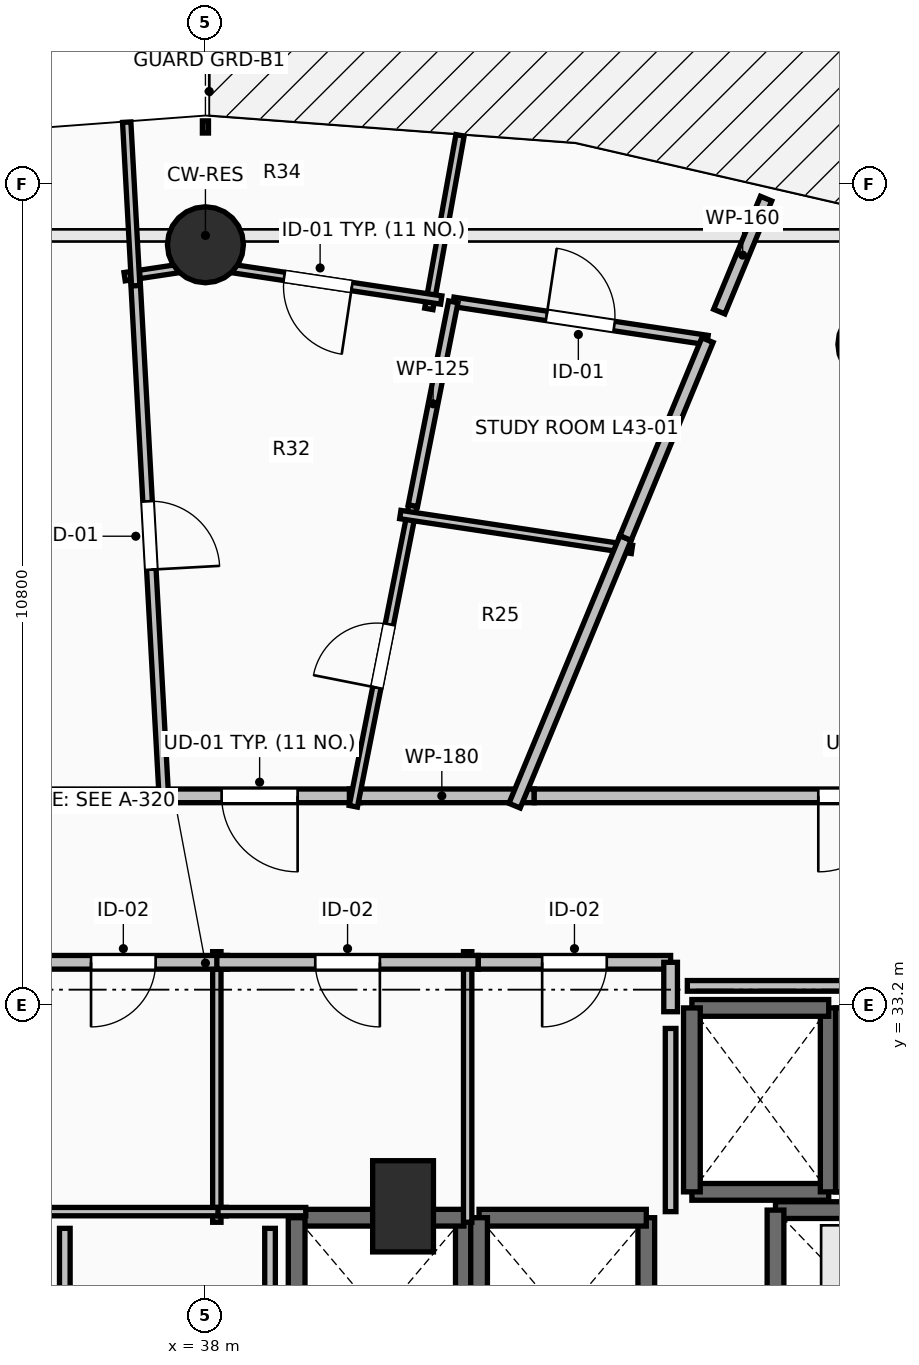
"""IFC4 building model, lengths in metres.
Left out: names, types, materials, properties, quantities, classifications, styles, units other than length and angle.
Written with IfcOpenShell. Run it as: python <this file> out.ifc"""

import sys

from ifc_helpers import new_model, si_unit, direction, frame, frame_2d, origin, origin_2d, place, context, subcontext, project, spatial, rectangle, circle, extrude, element, fill, save


model = new_model("IFC4")
c1 = context("Model", 3, precision=1e-05, world=origin(), true_north=direction((0.0, 1.0)))
c2 = subcontext(c1, "Body", "Model", "MODEL_VIEW")
j1 = project(units=[si_unit("LENGTHUNIT", "METRE"), si_unit("PLANEANGLEUNIT", "RADIAN")], contexts=[c1])
p1 = place(None, origin())
s1 = spatial("IfcSite", under=j1, at=p1, CompositionType="ELEMENT")
p2 = place(p1, origin())
s2 = spatial("IfcBuilding", under=s1, at=p2, CompositionType="ELEMENT")
p3 = place(p2, frame((0.0, 0.0, 160.6)))
s3 = spatial("IfcBuildingStorey", under=s2, at=p3, CompositionType="ELEMENT", Elevation=160.6)
for number, where, z_axis, x_axis in (
    (1, (46.821, 41.891, 0.0), (0.0, 0.0, 1.0), (0.383, 0.924, 0.0)),
    (2, (38.0, 43.2, 0.0), (0.0, 0.0, 1.0), (0.0, 1.0, 0.0)),
):
    element("IfcColumn", number, at=place(p3, frame(where, z_axis=z_axis, x_axis=x_axis)), inside=s3, PredefinedType="COLUMN", context=c2, shape_type="SweptSolid", body=[
        extrude(circle(Radius=0.5, at=origin_2d()), origin(), (0.0, 0.0, 1.0), 3.5),
    ])
p4 = place(p3, frame((40.6, 30.55, 0.0), z_axis=(0.0, 0.0, 1.0), x_axis=(1.0, 0.0, 0.0)))
e3 = element("IfcColumn", 3, at=p4, inside=s3, PredefinedType="PILASTER", context=c2, shape_type="SweptSolid", body=[
    extrude(rectangle(XDim=0.8, YDim=1.2, at=origin_2d()), origin(), (0.0, 0.0, 1.0), 3.5),
])
p5 = place(p3, frame((41.4, 27.8, 0.0), z_axis=(0.0, 0.0, 1.0), x_axis=(0.0, 1.0, 0.0)))
e4 = element("IfcWall", 4, at=p5, inside=s3, PredefinedType="SOLIDWALL", context=c2, shape_type="SweptSolid", body=[
    extrude(rectangle(XDim=2.6, YDim=0.22, at=frame_2d((1.3, 0.0))), origin(), (0.0, 0.0, 1.0), 3.24),
])
p6 = place(p3, frame((41.4, 30.4, 0.0), z_axis=(0.0, 0.0, 1.0), x_axis=(-1.0, 0.0, 0.0)))
e5 = element("IfcWall", 5, at=p6, inside=s3, PredefinedType="SOLIDWALL", context=c2, shape_type="SweptSolid", body=[
    extrude(rectangle(XDim=2.2, YDim=0.22, at=frame_2d((1.1, 0.0))), origin(), (0.0, 0.0, 1.0), 3.24),
])
for number, where, z_axis, x_axis in (
    (6, (39.2, 30.4, 0.0), (0.0, 0.0, 1.0), (0.0, -1.0, 0.0)),
    (7, (43.8, 27.8, 0.0), (0.0, 0.0, 1.0), (0.0, 1.0, 0.0)),
):
    element("IfcWall", number, at=place(p3, frame(where, z_axis=z_axis, x_axis=x_axis)), inside=s3, PredefinedType="SOLIDWALL", context=c2, shape_type="SweptSolid", body=[
        extrude(rectangle(XDim=2.6, YDim=0.22, at=frame_2d((1.3, 0.0))), origin(), (0.0, 0.0, 1.0), 3.24),
    ])
p7 = place(p3, frame((43.8, 30.4, 0.0), z_axis=(0.0, 0.0, 1.0), x_axis=(-1.0, 0.0, 0.0)))
e8 = element("IfcWall", 8, at=p7, inside=s3, PredefinedType="SOLIDWALL", context=c2, shape_type="SweptSolid", body=[
    extrude(rectangle(XDim=2.2, YDim=0.22, at=frame_2d((1.1, 0.0))), origin(), (0.0, 0.0, 1.0), 3.24),
])
p8 = place(p3, frame((41.6, 30.4, 0.0), z_axis=(0.0, 0.0, 1.0), x_axis=(0.0, -1.0, 0.0)))
e9 = element("IfcWall", 9, at=p8, inside=s3, PredefinedType="SOLIDWALL", context=c2, shape_type="SweptSolid", body=[
    extrude(rectangle(XDim=2.6, YDim=0.22, at=frame_2d((1.3, 0.0))), origin(), (0.0, 0.0, 1.0), 3.24),
])
p9 = place(p3, frame((44.4, 30.74, 0.0), z_axis=(0.0, 0.0, 1.0), x_axis=(1.0, 0.0, 0.0)))
e10 = element("IfcWall", 10, at=p9, inside=s3, PredefinedType="SOLIDWALL", context=c2, shape_type="SweptSolid", body=[
    extrude(rectangle(XDim=1.8, YDim=0.22, at=frame_2d((0.9, 0.0))), origin(), (0.0, 0.0, 1.0), 3.24),
])
p10 = place(p3, frame((46.2, 30.74, 0.0), z_axis=(0.0, 0.0, 1.0), x_axis=(0.0, 1.0, 0.0)))
e11 = element("IfcWall", 11, at=p10, inside=s3, PredefinedType="SOLIDWALL", context=c2, shape_type="SweptSolid", body=[
    extrude(rectangle(XDim=2.42, YDim=0.22, at=frame_2d((1.21, 0.0))), origin(), (0.0, 0.0, 1.0), 3.24),
])
p11 = place(p3, frame((46.2, 33.16, 0.0), z_axis=(0.0, 0.0, 1.0), x_axis=(-1.0, 0.0, 0.0)))
e12 = element("IfcWall", 12, at=p11, inside=s3, PredefinedType="SOLIDWALL", context=c2, shape_type="SweptSolid", body=[
    extrude(rectangle(XDim=1.8, YDim=0.22, at=frame_2d((0.9, 0.0))), origin(), (0.0, 0.0, 1.0), 3.24),
])
for number, where, z_axis, x_axis in (
    (13, (44.4, 33.16, 0.0), (0.0, 0.0, 1.0), (0.0, -1.0, 0.0)),
    (14, (46.4, 33.16, 0.0), (0.0, 0.0, 1.0), (0.0, -1.0, 0.0)),
):
    element("IfcWall", number, at=place(p3, frame(where, z_axis=z_axis, x_axis=x_axis)), inside=s3, PredefinedType="SOLIDWALL", context=c2, shape_type="SweptSolid", body=[
        extrude(rectangle(XDim=2.42, YDim=0.22, at=frame_2d((1.21, 0.0))), origin(), (0.0, 0.0, 1.0), 3.24),
    ])
p12 = place(p3, frame((47.9, 30.5, 0.0), z_axis=(0.0, 0.0, 1.0), x_axis=(-1.0, 0.0, 0.0)))
e15 = element("IfcWall", 15, at=p12, inside=s3, PredefinedType="SHEAR", context=c2, shape_type="SweptSolid", body=[
    extrude(rectangle(XDim=2.4, YDim=0.22, at=frame_2d((1.2, 0.0))), origin(), (0.0, 0.0, 1.0), 3.24),
])
p13 = place(p3, frame((45.5, 30.5, 0.0), z_axis=(0.0, 0.0, 1.0), x_axis=(0.0, -1.0, 0.0)))
e16 = element("IfcWall", 16, at=p13, inside=s3, PredefinedType="SHEAR", context=c2, shape_type="SweptSolid", body=[
    extrude(rectangle(XDim=2.5, YDim=0.22, at=frame_2d((1.25, 0.0))), origin(), (0.0, 0.0, 1.0), 3.24),
])
p14 = place(p3, frame((38.15, 30.34, 0.0), z_axis=(0.0, 0.0, 1.0), x_axis=(0.0, 1.0, 0.0)))
e17 = element("IfcWall", 17, at=p14, inside=s3, PredefinedType="PARTITIONING", context=c2, shape_type="SweptSolid", body=[
    extrude(rectangle(XDim=3.56, YDim=0.11, at=frame_2d((1.78, 0.0))), origin(), (0.0, 0.0, 1.0), 2.432),
])
p15 = place(p3, frame((35.68, 30.48, 0.0), z_axis=(0.0, 0.0, 1.0), x_axis=(1.0, 0.0, 0.0)))
e18 = element("IfcWall", 18, at=p15, inside=s3, PredefinedType="PARTITIONING", context=c2, shape_type="SweptSolid", body=[
    extrude(rectangle(XDim=2.595, YDim=0.11, at=frame_2d((1.297, 0.0))), origin(), (0.0, 0.0, 1.0), 2.432),
])
p16 = place(p3, frame((38.29, 33.76, 0.0), z_axis=(0.0, 0.0, 1.0), x_axis=(-1.0, 0.0, 0.0)))
e19 = element("IfcWall", 19, at=p16, inside=s3, PredefinedType="PARTITIONING", context=c2, shape_type="SweptSolid", body=[
    extrude(rectangle(XDim=2.74, YDim=0.18, at=frame_2d((1.37, 0.0))), origin(), (0.0, 0.0, 1.0), 3.24),
])
p17 = place(p16, frame((0.945, 0.0, 0.0)))
e20 = element("IfcOpeningElement", 20, at=p17, cuts=e19, PredefinedType="OPENING", context=c2, shape_type="SweptSolid", body=[
    extrude(rectangle(XDim=0.85, YDim=2.1, at=frame_2d((0.425, 1.05))), frame((0.0, 0.105, 0.0), z_axis=(0.0, -1.0, 0.0), x_axis=(1.0, 0.0, 0.0)), (0.0, 0.0, 1.0), 0.21),
])
p18 = place(p3, frame((41.45, 30.34, 0.0), z_axis=(0.0, 0.0, 1.0), x_axis=(0.0, 1.0, 0.0)))
e21 = element("IfcWall", 21, at=p18, inside=s3, PredefinedType="PARTITIONING", context=c2, shape_type="SweptSolid", body=[
    extrude(rectangle(XDim=3.56, YDim=0.11, at=frame_2d((1.78, 0.0))), origin(), (0.0, 0.0, 1.0), 3.24),
])
p19 = place(p3, frame((38.165, 30.48, 0.0), z_axis=(0.0, 0.0, 1.0), x_axis=(1.0, 0.0, 0.0)))
e22 = element("IfcWall", 22, at=p19, inside=s3, PredefinedType="PARTITIONING", context=c2, shape_type="SweptSolid", body=[
    extrude(rectangle(XDim=1.155, YDim=0.11, at=frame_2d((0.578, 0.0))), origin(), (0.0, 0.0, 1.0), 2.432),
])
p20 = place(p3, frame((41.59, 33.76, 0.0), z_axis=(0.0, 0.0, 1.0), x_axis=(-1.0, 0.0, 0.0)))
e23 = element("IfcWall", 23, at=p20, inside=s3, PredefinedType="PARTITIONING", context=c2, shape_type="SweptSolid", body=[
    extrude(rectangle(XDim=3.44, YDim=0.18, at=frame_2d((1.72, 0.0))), origin(), (0.0, 0.0, 1.0), 3.24),
])
p21 = place(p20, frame((1.295, 0.0, 0.0)))
e24 = element("IfcOpeningElement", 24, at=p21, cuts=e23, PredefinedType="OPENING", context=c2, shape_type="SweptSolid", body=[
    extrude(rectangle(XDim=0.85, YDim=2.1, at=frame_2d((0.425, 1.05))), frame((0.0, 0.105, 0.0), z_axis=(0.0, -1.0, 0.0), x_axis=(1.0, 0.0, 0.0)), (0.0, 0.0, 1.0), 0.21),
])
p22 = place(p3, frame((44.12, 33.76, 0.0), z_axis=(0.0, 0.0, 1.0), x_axis=(-1.0, 0.0, 0.0)))
e25 = element("IfcWall", 25, at=p22, inside=s3, PredefinedType="PARTITIONING", context=c2, shape_type="SweptSolid", body=[
    extrude(rectangle(XDim=2.53, YDim=0.18, at=frame_2d((1.265, 0.0))), origin(), (0.0, 0.0, 1.0), 3.24),
])
p23 = place(p22, frame((0.84, 0.0, 0.0)))
e26 = element("IfcOpeningElement", 26, at=p23, cuts=e25, PredefinedType="OPENING", context=c2, shape_type="SweptSolid", body=[
    extrude(rectangle(XDim=0.85, YDim=2.1, at=frame_2d((0.425, 1.05))), frame((0.0, 0.105, 0.0), z_axis=(0.0, -1.0, 0.0), x_axis=(1.0, 0.0, 0.0)), (0.0, 0.0, 1.0), 0.21),
])
p24 = place(p3, frame((44.12, 33.11, 0.0), z_axis=(0.0, 0.0, 1.0), x_axis=(0.0, 1.0, 0.0)))
e27 = element("IfcWall", 27, at=p24, inside=s3, PredefinedType="PARTITIONING", context=c2, shape_type="SweptSolid", body=[
    extrude(rectangle(XDim=0.65, YDim=0.18, at=frame_2d((0.325, 0.0))), origin(), (0.0, 0.0, 1.0), 3.24),
])
p25 = place(p3, frame((40.034, 35.95, 0.0), z_axis=(0.0, 0.0, 1.0), x_axis=(-1.0, 0.0, 0.0)))
e28 = element("IfcWall", 28, at=p25, inside=s3, PredefinedType="PARTITIONING", context=c2, shape_type="SweptSolid", body=[
    extrude(rectangle(XDim=2.642, YDim=0.18, at=frame_2d((1.321, 0.0))), origin(), (0.0, 0.0, 1.0), 3.24),
])
p26 = place(p25, frame((0.821, 0.0, 0.0)))
e29 = element("IfcOpeningElement", 29, at=p26, cuts=e28, PredefinedType="OPENING", context=c2, shape_type="SweptSolid", body=[
    extrude(rectangle(XDim=1.0, YDim=2.15, at=frame_2d((0.5, 1.075))), frame((0.0, 0.105, 0.0), z_axis=(0.0, -1.0, 0.0), x_axis=(1.0, 0.0, 0.0)), (0.0, 0.0, 1.0), 0.21),
])
p27 = place(p3, frame((42.326, 35.95, 0.0), z_axis=(0.0, 0.0, 1.0), x_axis=(-1.0, 0.0, 0.0)))
e30 = element("IfcWall", 30, at=p27, inside=s3, PredefinedType="PARTITIONING", context=c2, shape_type="SweptSolid", body=[
    extrude(rectangle(XDim=2.432, YDim=0.18, at=frame_2d((1.216, 0.0))), origin(), (0.0, 0.0, 1.0), 3.24),
])
p28 = place(p3, frame((37.392, 35.95, 0.0), z_axis=(0.0, 0.0, 1.0), x_axis=(-1.0, 0.0, 0.0)))
e31 = element("IfcWall", 31, at=p28, inside=s3, PredefinedType="PARTITIONING", context=c2, shape_type="SweptSolid", body=[
    extrude(rectangle(XDim=1.863, YDim=0.18, at=frame_2d((0.932, 0.0))), origin(), (0.0, 0.0, 1.0), 3.24),
])
p29 = place(p3, frame((50.8, 35.95, 0.0), z_axis=(0.0, 0.0, 1.0), x_axis=(-1.0, 0.0, 0.0)))
e32 = element("IfcWall", 32, at=p29, inside=s3, PredefinedType="PARTITIONING", context=c2, shape_type="SweptSolid", body=[
    extrude(rectangle(XDim=8.474, YDim=0.18, at=frame_2d((4.237, 0.0))), origin(), (0.0, 0.0, 1.0), 2.432),
])
p30 = place(p29, frame((3.737, 0.0, 0.0)))
e33 = element("IfcOpeningElement", 33, at=p30, cuts=e32, PredefinedType="OPENING", context=c2, shape_type="SweptSolid", body=[
    extrude(rectangle(XDim=1.0, YDim=2.15, at=frame_2d((0.5, 1.075))), frame((0.0, 0.105, 0.0), z_axis=(0.0, -1.0, 0.0), x_axis=(1.0, 0.0, 0.0)), (0.0, 0.0, 1.0), 0.21),
])
p31 = place(p3, frame((39.946, 35.813, 0.0), z_axis=(0.0, 0.0, 1.0), x_axis=(0.194333977895, 0.980935423479, 0.0)))
e34 = element("IfcWall", 34, at=p31, inside=s3, PredefinedType="PARTITIONING", context=c2, shape_type="SweptSolid", body=[
    extrude(rectangle(XDim=4.031, YDim=0.11, at=frame_2d((2.016, 0.0))), origin(), (0.0, 0.0, 1.0), 2.886),
])
p32 = place(p31, frame((1.591, 0.0, 0.0)))
e35 = element("IfcOpeningElement", 35, at=p32, cuts=e34, PredefinedType="OPENING", context=c2, shape_type="SweptSolid", body=[
    extrude(rectangle(XDim=0.85, YDim=2.1, at=frame_2d((0.425, 1.05))), frame((0.0, 0.07, 0.0), z_axis=(0.0, -1.0, 0.0), x_axis=(1.0, 0.0, 0.0)), (0.0, 0.0, 1.0), 0.14),
])
p33 = place(p3, frame((41.35, 44.64, 0.0), z_axis=(0.0, 0.0, 1.0), x_axis=(-0.176977699102, -0.984214861715, 0.0)))
e36 = element("IfcWall", 36, at=p33, inside=s3, PredefinedType="PARTITIONING", context=c2, shape_type="SweptSolid", body=[
    extrude(rectangle(XDim=2.32, YDim=0.11, at=frame_2d((1.16, 0.0))), origin(), (0.0, 0.0, 1.0), 2.728),
])
p34 = place(p3, frame((41.102, 42.473, 0.0), z_axis=(0.0, 0.0, 1.0), x_axis=(-0.98887178047, 0.148770298749, 0.0)))
e37 = element("IfcWall", 37, at=p34, inside=s3, PredefinedType="PARTITIONING", context=c2, shape_type="SweptSolid", body=[
    extrude(rectangle(XDim=3.277, YDim=0.11, at=frame_2d((1.639, 0.0))), origin(), (0.0, 0.0, 1.0), 2.432),
])
p35 = place(p34, frame((1.189, 0.0, 0.0)))
e38 = element("IfcOpeningElement", 38, at=p35, cuts=e37, PredefinedType="OPENING", context=c2, shape_type="SweptSolid", body=[
    extrude(rectangle(XDim=0.9, YDim=2.1, at=frame_2d((0.45, 1.05))), frame((0.0, 0.07, 0.0), z_axis=(0.0, -1.0, 0.0), x_axis=(1.0, 0.0, 0.0)), (0.0, 0.0, 1.0), 0.14),
])
p36 = place(p3, frame((38.138, 42.961, 0.0), z_axis=(0.0, 0.0, 1.0), x_axis=(-0.988920139242, -0.148448503534, 0.0)))
e39 = element("IfcWall", 39, at=p36, inside=s3, PredefinedType="PARTITIONING", context=c2, shape_type="SweptSolid", body=[
    extrude(rectangle(XDim=1.215, YDim=0.11, at=frame_2d((0.608, 0.0))), origin(), (0.0, 0.0, 1.0), 2.432),
])
p37 = place(p3, frame((41.261, 42.449, 0.0), z_axis=(0.0, 0.0, 1.0), x_axis=(0.988878555922, -0.148725255545, 0.0)))
e40 = element("IfcWall", 40, at=p37, inside=s3, PredefinedType="PARTITIONING", context=c2, shape_type="SweptSolid", body=[
    extrude(rectangle(XDim=3.382, YDim=0.125, at=frame_2d((1.691, 0.0))), origin(), (0.0, 0.0, 1.0), 3.24),
])
p38 = place(p37, frame((1.241, 0.0, 0.0)))
e41 = element("IfcOpeningElement", 41, at=p38, cuts=e40, PredefinedType="OPENING", context=c2, shape_type="SweptSolid", body=[
    extrude(rectangle(XDim=0.9, YDim=2.1, at=frame_2d((0.45, 1.05))), frame((0.0, 0.077, 0.0), z_axis=(0.0, -1.0, 0.0), x_axis=(1.0, 0.0, 0.0)), (0.0, 0.0, 1.0), 0.155),
])
p39 = place(p3, frame((40.729, 39.767, 0.0), z_axis=(0.0, 0.0, 1.0), x_axis=(0.194501549107, 0.980902210924, 0.0)))
e42 = element("IfcWall", 42, at=p39, inside=s3, PredefinedType="PARTITIONING", context=c2, shape_type="SweptSolid", body=[
    extrude(rectangle(XDim=2.734, YDim=0.125, at=frame_2d((1.367, 0.0))), origin(), (0.0, 0.0, 1.0), 2.886),
])
p40 = place(p3, frame((37.075, 42.801, 0.0), z_axis=(0.0, 0.0, 1.0), x_axis=(0.054937930554, -0.998489771498, 0.0)))
e43 = element("IfcWall", 43, at=p40, inside=s3, PredefinedType="PARTITIONING", context=c2, shape_type="SweptSolid", body=[
    extrude(rectangle(XDim=6.861, YDim=0.125, at=frame_2d((3.431, 0.0))), origin(), (0.0, 0.0, 1.0), 2.432),
])
p41 = place(p40, frame((2.981, 0.0, 0.0)))
e44 = element("IfcOpeningElement", 44, at=p41, cuts=e43, PredefinedType="OPENING", context=c2, shape_type="SweptSolid", body=[
    extrude(rectangle(XDim=0.9, YDim=2.1, at=frame_2d((0.45, 1.05))), frame((0.0, 0.077, 0.0), z_axis=(0.0, -1.0, 0.0), x_axis=(1.0, 0.0, 0.0)), (0.0, 0.0, 1.0), 0.155),
])
p42 = place(p3, frame((44.76, 42.321, 0.0), z_axis=(0.0, 0.0, 1.0), x_axis=(0.382955001099, 0.923766998292, 0.0)))
e45 = element("IfcWall", 45, at=p42, inside=s3, PredefinedType="PARTITIONING", context=c2, shape_type="SweptSolid", body=[
    extrude(rectangle(XDim=1.608, YDim=0.16, at=frame_2d((0.804, 0.0))), origin(), (0.0, 0.0, 1.0), 2.728),
])
p43 = place(p3, frame((43.611, 39.192, 0.0), z_axis=(0.0, 0.0, 1.0), x_axis=(-0.988860105068, 0.148847884116, 0.0)))
e46 = element("IfcWall", 46, at=p43, inside=s3, PredefinedType="PARTITIONING", context=c2, shape_type="SweptSolid", body=[
    extrude(rectangle(XDim=3.082, YDim=0.11, at=frame_2d((1.541, 0.0))), origin(), (0.0, 0.0, 1.0), 2.886),
])
p44 = place(p3, frame((42.067, 35.821, 0.0), z_axis=(0.0, 0.0, 1.0), x_axis=(0.382813734438, 0.92382554886, 0.0)))
e47 = element("IfcWall", 47, at=p44, inside=s3, PredefinedType="PARTITIONING", context=c2, shape_type="SweptSolid", body=[
    extrude(rectangle(XDim=3.812, YDim=0.16, at=frame_2d((1.906, 0.0))), origin(), (0.0, 0.0, 1.0), 2.886),
])
p45 = place(p3, frame((36.964, 44.813, 0.0), z_axis=(0.0, 0.0, 1.0), x_axis=(0.054949193079, -0.998489151759, 0.0)))
e48 = element("IfcWall", 48, at=p45, inside=s3, PredefinedType="PARTITIONING", context=c2, shape_type="SweptSolid", body=[
    extrude(rectangle(XDim=2.155, YDim=0.11, at=frame_2d((1.077, 0.0))), origin(), (0.0, 0.0, 1.0), 2.432),
])
p46 = place(p3, frame((43.527, 39.342, 0.0), z_axis=(0.0, 0.0, 1.0), x_axis=(0.38263998022, 0.923897529782, 0.0)))
e49 = element("IfcWall", 49, at=p46, inside=s3, PredefinedType="PARTITIONING", context=c2, shape_type="SweptSolid", body=[
    extrude(rectangle(XDim=2.818, YDim=0.16, at=frame_2d((1.409, 0.0))), origin(), (0.0, 0.0, 1.0), 2.886),
])
p47 = place(p3, frame((44.12, 30.48, 0.0), z_axis=(0.0, 0.0, 1.0), x_axis=(0.0, 1.0, 0.0)))
e50 = element("IfcWall", 50, at=p47, inside=s3, PredefinedType="PARTITIONING", context=c2, shape_type="SweptSolid", body=[
    extrude(rectangle(XDim=2.41, YDim=0.14, at=frame_2d((1.205, 0.0))), origin(), (0.0, 0.0, 1.0), 3.24),
])
for number, where, z_axis, x_axis in (
    (51, (36.15, 30.26, 0.0), (0.0, 0.0, 1.0), (0.0, -1.0, 0.0)),
    (52, (38.85, 27.87, 0.0), (0.0, 0.0, 1.0), (0.0, 1.0, 0.0)),
):
    element("IfcWall", number, at=place(p3, frame(where, z_axis=z_axis, x_axis=x_axis)), inside=s3, PredefinedType="PARTITIONING", context=c2, shape_type="SweptSolid", body=[
        extrude(rectangle(XDim=2.39, YDim=0.14, at=frame_2d((1.195, 0.0))), origin(), (0.0, 0.0, 1.0), 3.24),
    ])
p48 = place(p3, frame((48.55, 33.45, 0.0), z_axis=(0.0, 0.0, 1.0), x_axis=(-1.0, 0.0, 0.0)))
e53 = element("IfcWall", 53, at=p48, inside=s3, PredefinedType="PARTITIONING", context=c2, shape_type="SweptSolid", body=[
    extrude(rectangle(XDim=4.21, YDim=0.14, at=frame_2d((2.105, 0.0))), origin(), (0.0, 0.0, 1.0), 2.432),
])
p49 = place(p17, origin())
e54 = element("IfcDoor", 54, at=p49, inside=s3, OperationType="SINGLE_SWING_RIGHT", PredefinedType="DOOR", context=c2, shape_type="SweptSolid", body=[
    extrude(rectangle(XDim=0.85, YDim=2.1, at=frame_2d((0.425, 1.05))), frame((0.0, 0.025, 0.0), z_axis=(0.0, -1.0, 0.0), x_axis=(1.0, 0.0, 0.0)), (0.0, 0.0, 1.0), 0.05),
])
fill(e20, e54)
p50 = place(p21, origin())
e55 = element("IfcDoor", 55, at=p50, inside=s3, OperationType="SINGLE_SWING_LEFT", PredefinedType="DOOR", context=c2, shape_type="SweptSolid", body=[
    extrude(rectangle(XDim=0.85, YDim=2.1, at=frame_2d((0.425, 1.05))), frame((0.0, 0.025, 0.0), z_axis=(0.0, -1.0, 0.0), x_axis=(1.0, 0.0, 0.0)), (0.0, 0.0, 1.0), 0.05),
])
fill(e24, e55)
p51 = place(p23, origin())
e56 = element("IfcDoor", 56, at=p51, inside=s3, OperationType="SINGLE_SWING_RIGHT", PredefinedType="DOOR", context=c2, shape_type="SweptSolid", body=[
    extrude(rectangle(XDim=0.85, YDim=2.1, at=frame_2d((0.425, 1.05))), frame((0.0, 0.025, 0.0), z_axis=(0.0, -1.0, 0.0), x_axis=(1.0, 0.0, 0.0)), (0.0, 0.0, 1.0), 0.05),
])
fill(e26, e56)
p52 = place(p26, origin())
e57 = element("IfcDoor", 57, at=p52, inside=s3, OperationType="SINGLE_SWING_LEFT", PredefinedType="DOOR", context=c2, shape_type="SweptSolid", body=[
    extrude(rectangle(XDim=1.0, YDim=2.15, at=frame_2d((0.5, 1.075))), frame((0.0, 0.025, 0.0), z_axis=(0.0, -1.0, 0.0), x_axis=(1.0, 0.0, 0.0)), (0.0, 0.0, 1.0), 0.05),
])
fill(e29, e57)
p53 = place(p30, origin())
e58 = element("IfcDoor", 58, at=p53, inside=s3, OperationType="SINGLE_SWING_RIGHT", PredefinedType="DOOR", context=c2, shape_type="SweptSolid", body=[
    extrude(rectangle(XDim=1.0, YDim=2.15, at=frame_2d((0.5, 1.075))), frame((0.0, 0.025, 0.0), z_axis=(0.0, -1.0, 0.0), x_axis=(1.0, 0.0, 0.0)), (0.0, 0.0, 1.0), 0.05),
])
fill(e33, e58)
p54 = place(p32, origin())
e59 = element("IfcDoor", 59, at=p54, inside=s3, OperationType="SINGLE_SWING_LEFT", PredefinedType="DOOR", context=c2, shape_type="SweptSolid", body=[
    extrude(rectangle(XDim=0.85, YDim=2.1, at=frame_2d((0.425, 1.05))), frame((0.0, 0.025, 0.0), z_axis=(0.0, -1.0, 0.0), x_axis=(1.0, 0.0, 0.0)), (0.0, 0.0, 1.0), 0.05),
])
fill(e35, e59)
p55 = place(p35, origin())
e60 = element("IfcDoor", 60, at=p55, inside=s3, OperationType="SINGLE_SWING_LEFT", PredefinedType="DOOR", context=c2, shape_type="SweptSolid", body=[
    extrude(rectangle(XDim=0.9, YDim=2.1, at=frame_2d((0.45, 1.05))), frame((0.0, 0.025, 0.0), z_axis=(0.0, -1.0, 0.0), x_axis=(1.0, 0.0, 0.0)), (0.0, 0.0, 1.0), 0.05),
])
fill(e38, e60)
p56 = place(p38, origin())
e61 = element("IfcDoor", 61, at=p56, inside=s3, OperationType="SINGLE_SWING_LEFT", PredefinedType="DOOR", context=c2, shape_type="SweptSolid", body=[
    extrude(rectangle(XDim=0.9, YDim=2.1, at=frame_2d((0.45, 1.05))), frame((0.0, 0.025, 0.0), z_axis=(0.0, -1.0, 0.0), x_axis=(1.0, 0.0, 0.0)), (0.0, 0.0, 1.0), 0.05),
])
fill(e41, e61)
p57 = place(p41, origin())
e62 = element("IfcDoor", 62, at=p57, inside=s3, OperationType="SINGLE_SWING_RIGHT", PredefinedType="DOOR", context=c2, shape_type="SweptSolid", body=[
    extrude(rectangle(XDim=0.9, YDim=2.1, at=frame_2d((0.45, 1.05))), frame((0.0, 0.025, 0.0), z_axis=(0.0, -1.0, 0.0), x_axis=(1.0, 0.0, 0.0)), (0.0, 0.0, 1.0), 0.05),
])
fill(e44, e62)
save(model, sys.argv[1])
